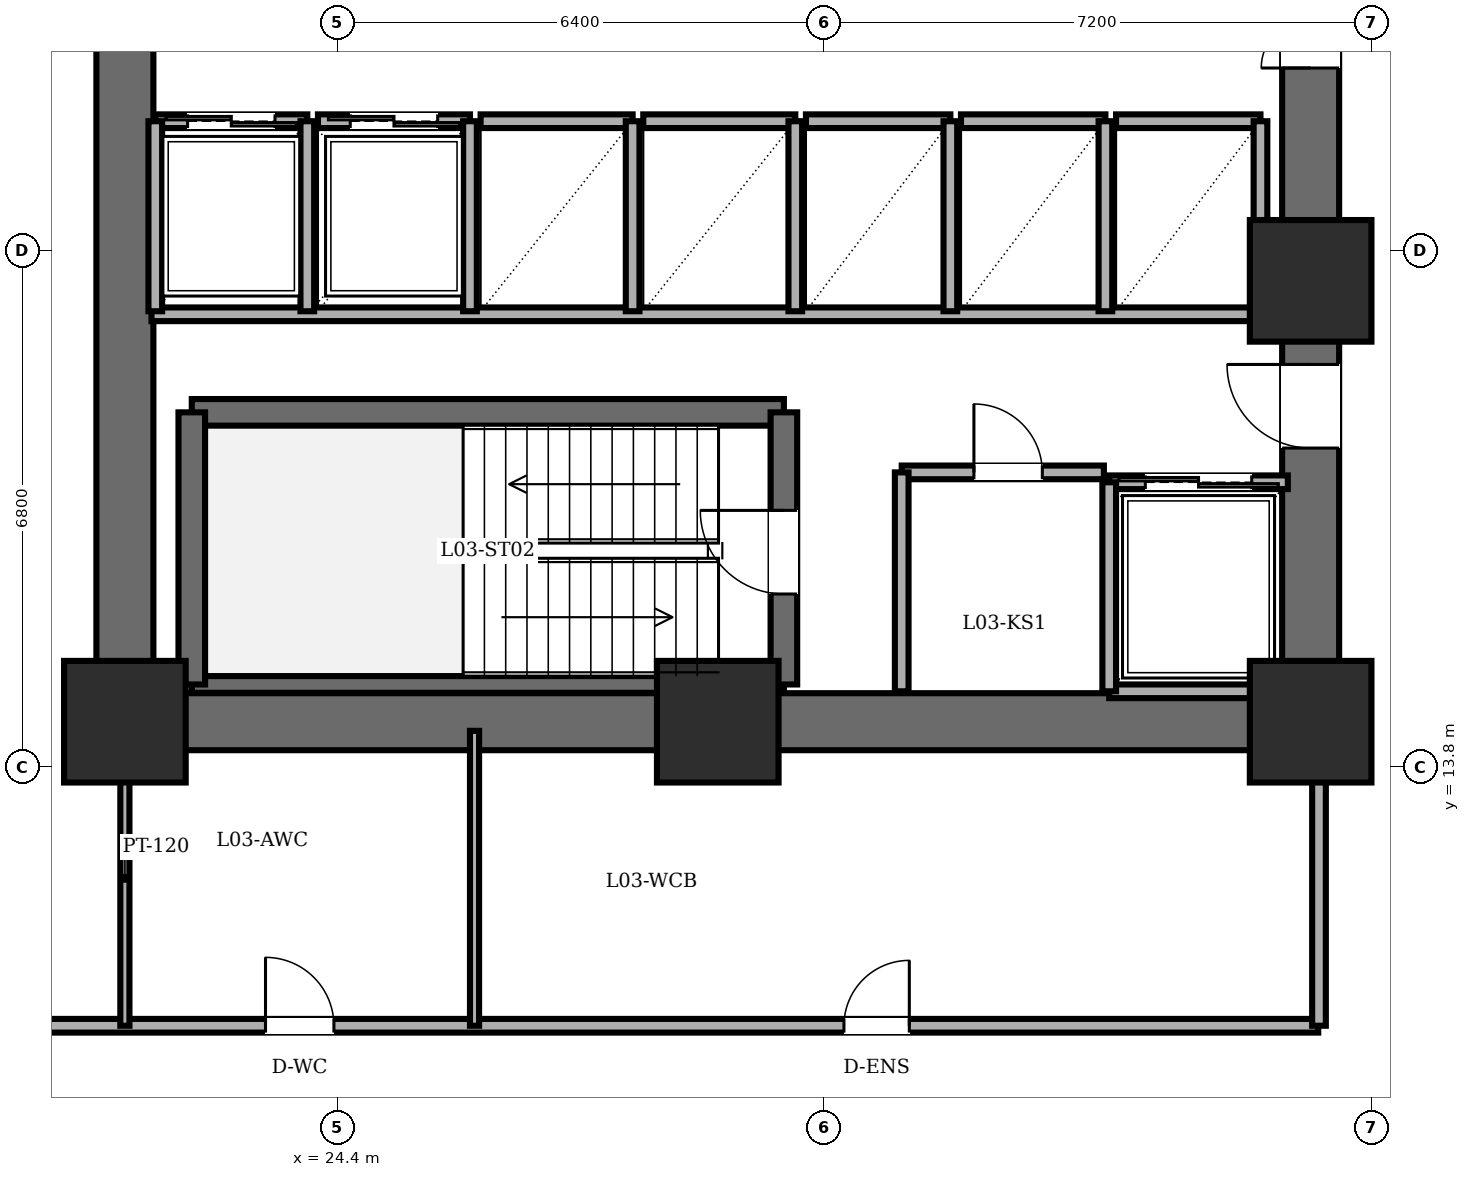
"""IFC4 building model, lengths in metres.
Left out: names, types, materials, properties, quantities, classifications, styles, units other than length and angle.
Written with IfcOpenShell. Run it as: python <this file> out.ifc"""

import sys

from ifc_helpers import new_model, si_unit, direction, frame, frame_2d, origin, origin_2d, place, context, subcontext, project, spatial, rectangle, extrude, element, fill, save


model = new_model("IFC4")
c1 = context("Model", 3, precision=1e-05, world=origin(), true_north=direction((0.0, 1.0)))
c2 = subcontext(c1, "Body", "Model", "MODEL_VIEW")
j1 = project(units=[si_unit("LENGTHUNIT", "METRE"), si_unit("PLANEANGLEUNIT", "RADIAN")], contexts=[c1])
p1 = place(None, origin())
s1 = spatial("IfcSite", under=j1, at=p1, CompositionType="ELEMENT")
p2 = place(p1, origin())
s2 = spatial("IfcBuilding", under=s1, at=p2, CompositionType="ELEMENT")
p3 = place(p2, frame((0.0, 0.0, 10.05)))
s3 = spatial("IfcBuildingStorey", under=s2, at=p3, CompositionType="ELEMENT", Elevation=10.05)
for number, where, z_axis, x_axis in (
    (1, (21.6, 14.4, 0.0), (0.0, 0.0, 1.0), (1.0, 0.0, 0.0)),
    (2, (29.4, 14.4, 0.0), (0.0, 0.0, 1.0), (1.0, 0.0, 0.0)),
    (3, (37.2, 14.4, 0.0), (0.0, 0.0, 1.0), (1.0, 0.0, 0.0)),
    (4, (37.2, 20.2, 0.0), (0.0, 0.0, 1.0), (1.0, 0.0, 0.0)),
):
    element("IfcColumn", number, at=place(p3, frame(where, z_axis=z_axis, x_axis=x_axis)), inside=s3, PredefinedType="COLUMN", context=c2, shape_type="SweptSolid", body=[
        extrude(rectangle(XDim=1.6, YDim=1.6, at=origin_2d()), origin(), (0.0, 0.0, 1.0), 4.65),
    ])
p4 = place(p3, frame((21.6, 14.4, 0.0), z_axis=(0.0, 0.0, 1.0), x_axis=(0.0, 1.0, 0.0)))
e5 = element("IfcWall", 5, at=p4, inside=s3, PredefinedType="SHEAR", context=c2, shape_type="SweptSolid", body=[
    extrude(rectangle(XDim=19.2, YDim=0.75, at=frame_2d((9.6, 0.0))), origin(), (0.0, 0.0, 1.0), 4.43),
])
p5 = place(p3, frame((37.2, 14.4, 0.0), z_axis=(0.0, 0.0, 1.0), x_axis=(-1.0, 0.0, 0.0)))
e6 = element("IfcWall", 6, at=p5, inside=s3, PredefinedType="SHEAR", context=c2, shape_type="SweptSolid", body=[
    extrude(rectangle(XDim=15.6, YDim=0.75, at=frame_2d((7.8, 0.0))), origin(), (0.0, 0.0, 1.0), 4.43),
])
p6 = place(p3, frame((37.2, 14.4, 0.0), z_axis=(0.0, 0.0, 1.0), x_axis=(0.0, 1.0, 0.0)))
e7 = element("IfcWall", 7, at=p6, inside=s3, PredefinedType="SHEAR", context=c2, shape_type="SweptSolid", body=[
    extrude(rectangle(XDim=19.2, YDim=0.75, at=frame_2d((9.6, 0.0))), origin(), (0.0, 0.0, 1.0), 4.43),
])
p7 = place(p6, frame((15.8, 0.0, 0.0)))
e8 = element("IfcOpeningElement", 8, at=p7, cuts=e7, PredefinedType="OPENING", context=c2, shape_type="SweptSolid", body=[
    extrude(rectangle(XDim=1.15, YDim=2.15, at=frame_2d((0.575, 1.075))), frame((0.0, 0.385, 0.0), z_axis=(0.0, -1.0, 0.0), x_axis=(1.0, 0.0, 0.0)), (0.0, 0.0, 1.0), 0.77),
])
p8 = place(p6, frame((3.6, 0.0, 0.0)))
e9 = element("IfcOpeningElement", 9, at=p8, cuts=e7, PredefinedType="OPENING", context=c2, shape_type="SweptSolid", body=[
    extrude(rectangle(XDim=1.1, YDim=2.15, at=frame_2d((0.55, 1.075))), frame((0.0, 0.385, 0.0), z_axis=(0.0, -1.0, 0.0), x_axis=(1.0, 0.0, 0.0)), (0.0, 0.0, 1.0), 0.77),
])
p9 = place(p6, frame((8.6, 0.0, 0.0)))
e10 = element("IfcOpeningElement", 10, at=p9, cuts=e7, PredefinedType="OPENING", context=c2, shape_type="SweptSolid", body=[
    extrude(rectangle(XDim=1.3, YDim=2.2, at=frame_2d((0.65, 1.1))), frame((0.0, 0.385, 0.0), z_axis=(0.0, -1.0, 0.0), x_axis=(1.0, 0.0, 0.0)), (0.0, 0.0, 1.0), 0.77),
])
p10 = place(p3, frame((22.48, 18.47, 0.0), z_axis=(0.0, 0.0, 1.0), x_axis=(1.0, 0.0, 0.0)))
e11 = element("IfcWall", 11, at=p10, inside=s3, PredefinedType="SOLIDWALL", context=c2, shape_type="SweptSolid", body=[
    extrude(rectangle(XDim=7.79, YDim=0.35, at=frame_2d((3.895, 0.0))), origin(), (0.0, 0.0, 1.0), 4.43),
])
p11 = place(p3, frame((22.48, 14.89, 0.0), z_axis=(0.0, 0.0, 1.0), x_axis=(1.0, 0.0, 0.0)))
e12 = element("IfcWall", 12, at=p11, inside=s3, PredefinedType="PARTITIONING", context=c2, shape_type="SweptSolid", body=[
    extrude(rectangle(XDim=7.79, YDim=0.22, at=frame_2d((3.895, 0.0))), origin(), (0.0, 0.0, 1.0), 4.43),
])
p12 = place(p3, frame((22.48, 14.89, 0.0), z_axis=(0.0, 0.0, 1.0), x_axis=(0.0, 1.0, 0.0)))
e13 = element("IfcWall", 13, at=p12, inside=s3, PredefinedType="SOLIDWALL", context=c2, shape_type="SweptSolid", body=[
    extrude(rectangle(XDim=3.58, YDim=0.35, at=frame_2d((1.79, 0.0))), origin(), (0.0, 0.0, 1.0), 4.43),
])
p13 = place(p3, frame((30.27, 14.89, 0.0), z_axis=(0.0, 0.0, 1.0), x_axis=(0.0, 1.0, 0.0)))
e14 = element("IfcWall", 14, at=p13, inside=s3, PredefinedType="SOLIDWALL", context=c2, shape_type="SweptSolid", body=[
    extrude(rectangle(XDim=3.58, YDim=0.35, at=frame_2d((1.79, 0.0))), origin(), (0.0, 0.0, 1.0), 4.43),
])
p14 = place(p13, frame((1.19, 0.0, 0.0)))
e15 = element("IfcOpeningElement", 15, at=p14, cuts=e14, PredefinedType="OPENING", context=c2, shape_type="SweptSolid", body=[
    extrude(rectangle(XDim=1.1, YDim=2.15, at=frame_2d((0.55, 1.075))), frame((0.0, 0.185, 0.0), z_axis=(0.0, -1.0, 0.0), x_axis=(1.0, 0.0, 0.0)), (0.0, 0.0, 1.0), 0.37),
])
p15 = place(p3, frame((21.95, 19.76, 0.0), z_axis=(0.0, 0.0, 1.0), x_axis=(1.0, 0.0, 0.0)))
e16 = element("IfcWall", 16, at=p15, inside=s3, PredefinedType="PARTITIONING", context=c2, shape_type="SweptSolid", body=[
    extrude(rectangle(XDim=14.87, YDim=0.18, at=frame_2d((7.435, 0.0))), origin(), (0.0, 0.0, 1.0), 4.43),
])
p16 = place(p3, frame((31.82, 17.68, 0.0), z_axis=(0.0, 0.0, 1.0), x_axis=(1.0, 0.0, 0.0)))
e17 = element("IfcWall", 17, at=p16, inside=s3, PredefinedType="PARTITIONING", context=c2, shape_type="SweptSolid", body=[
    extrude(rectangle(XDim=2.66, YDim=0.18, at=frame_2d((1.33, 0.0))), origin(), (0.0, 0.0, 1.0), 4.43),
])
p17 = place(p16, frame((0.95, 0.0, 0.0)))
e18 = element("IfcOpeningElement", 18, at=p17, cuts=e17, PredefinedType="OPENING", context=c2, shape_type="SweptSolid", body=[
    extrude(rectangle(XDim=0.9, YDim=2.05, at=frame_2d((0.45, 1.025))), frame((0.0, 0.1, 0.0), z_axis=(0.0, -1.0, 0.0), x_axis=(1.0, 0.0, 0.0)), (0.0, 0.0, 1.0), 0.2),
])
p18 = place(p3, frame((31.82, 14.8, 0.0), z_axis=(0.0, 0.0, 1.0), x_axis=(0.0, 1.0, 0.0)))
e19 = element("IfcWall", 19, at=p18, inside=s3, PredefinedType="PARTITIONING", context=c2, shape_type="SweptSolid", body=[
    extrude(rectangle(XDim=2.88, YDim=0.18, at=frame_2d((1.44, 0.0))), origin(), (0.0, 0.0, 1.0), 4.43),
])
p19 = place(p3, frame((34.55, 17.55, 0.0), z_axis=(0.0, 0.0, 1.0), x_axis=(1.0, 0.0, 0.0)))
e20 = element("IfcWall", 20, at=p19, inside=s3, PredefinedType="PARTITIONING", context=c2, shape_type="SweptSolid", body=[
    extrude(rectangle(XDim=2.35, YDim=0.18, at=frame_2d((1.175, 0.0))), origin(), (0.0, 0.0, 1.0), 4.43),
])
p20 = place(p19, frame((0.475, 0.0, 0.0)))
e21 = element("IfcOpeningElement", 21, at=p20, cuts=e20, PredefinedType="OPENING", context=c2, shape_type="SweptSolid", body=[
    extrude(rectangle(XDim=1.4, YDim=2.3, at=frame_2d((0.7, 1.15))), frame((0.0, 0.1, 0.0), z_axis=(0.0, -1.0, 0.0), x_axis=(1.0, 0.0, 0.0)), (0.0, 0.0, 1.0), 0.2),
])
p21 = place(p3, frame((36.9, 14.8, 0.0), z_axis=(0.0, 0.0, 1.0), x_axis=(-1.0, 0.0, 0.0)))
e22 = element("IfcWall", 22, at=p21, inside=s3, PredefinedType="PARTITIONING", context=c2, shape_type="SweptSolid", body=[
    extrude(rectangle(XDim=2.35, YDim=0.18, at=frame_2d((1.175, 0.0))), origin(), (0.0, 0.0, 1.0), 4.43),
])
p22 = place(p3, frame((34.55, 17.55, 0.0), z_axis=(0.0, 0.0, 1.0), x_axis=(0.0, -1.0, 0.0)))
e23 = element("IfcWall", 23, at=p22, inside=s3, PredefinedType="PARTITIONING", context=c2, shape_type="SweptSolid", body=[
    extrude(rectangle(XDim=2.75, YDim=0.18, at=frame_2d((1.375, 0.0))), origin(), (0.0, 0.0, 1.0), 4.43),
])
p23 = place(p3, frame((22.0, 22.3, 0.0), z_axis=(0.0, 0.0, 1.0), x_axis=(1.0, 0.0, 0.0)))
e24 = element("IfcWall", 24, at=p23, inside=s3, PredefinedType="PARTITIONING", context=c2, shape_type="SweptSolid", body=[
    extrude(rectangle(XDim=2.0, YDim=0.18, at=frame_2d((1.0, 0.0))), origin(), (0.0, 0.0, 1.0), 4.43),
])
p24 = place(p23, frame((0.425, 0.0, 0.0)))
e25 = element("IfcOpeningElement", 25, at=p24, cuts=e24, PredefinedType="OPENING", context=c2, shape_type="SweptSolid", body=[
    extrude(rectangle(XDim=1.15, YDim=2.2, at=frame_2d((0.575, 1.1))), frame((0.0, 0.1, 0.0), z_axis=(0.0, -1.0, 0.0), x_axis=(1.0, 0.0, 0.0)), (0.0, 0.0, 1.0), 0.2),
])
for number, where, z_axis, x_axis in (
    (26, (24.0, 19.8, 0.0), (0.0, 0.0, 1.0), (0.0, 1.0, 0.0)),
    (27, (22.0, 22.3, 0.0), (0.0, 0.0, 1.0), (0.0, -1.0, 0.0)),
):
    element("IfcWall", number, at=place(p3, frame(where, z_axis=z_axis, x_axis=x_axis)), inside=s3, PredefinedType="PARTITIONING", context=c2, shape_type="SweptSolid", body=[
        extrude(rectangle(XDim=2.5, YDim=0.18, at=frame_2d((1.25, 0.0))), origin(), (0.0, 0.0, 1.0), 4.43),
    ])
p25 = place(p3, frame((24.14, 22.3, 0.0), z_axis=(0.0, 0.0, 1.0), x_axis=(1.0, 0.0, 0.0)))
e28 = element("IfcWall", 28, at=p25, inside=s3, PredefinedType="PARTITIONING", context=c2, shape_type="SweptSolid", body=[
    extrude(rectangle(XDim=2.0, YDim=0.18, at=frame_2d((1.0, 0.0))), origin(), (0.0, 0.0, 1.0), 4.43),
])
p26 = place(p25, frame((0.425, 0.0, 0.0)))
e29 = element("IfcOpeningElement", 29, at=p26, cuts=e28, PredefinedType="OPENING", context=c2, shape_type="SweptSolid", body=[
    extrude(rectangle(XDim=1.15, YDim=2.2, at=frame_2d((0.575, 1.1))), frame((0.0, 0.1, 0.0), z_axis=(0.0, -1.0, 0.0), x_axis=(1.0, 0.0, 0.0)), (0.0, 0.0, 1.0), 0.2),
])
p27 = place(p3, frame((26.14, 19.8, 0.0), z_axis=(0.0, 0.0, 1.0), x_axis=(0.0, 1.0, 0.0)))
e30 = element("IfcWall", 30, at=p27, inside=s3, PredefinedType="PARTITIONING", context=c2, shape_type="SweptSolid", body=[
    extrude(rectangle(XDim=2.5, YDim=0.18, at=frame_2d((1.25, 0.0))), origin(), (0.0, 0.0, 1.0), 4.43),
])
p28 = place(p3, frame((26.28, 22.3, 0.0), z_axis=(0.0, 0.0, 1.0), x_axis=(1.0, 0.0, 0.0)))
e31 = element("IfcWall", 31, at=p28, inside=s3, PredefinedType="PARTITIONING", context=c2, shape_type="SweptSolid", body=[
    extrude(rectangle(XDim=2.0, YDim=0.18, at=frame_2d((1.0, 0.0))), origin(), (0.0, 0.0, 1.0), 4.43),
])
p29 = place(p3, frame((28.28, 19.8, 0.0), z_axis=(0.0, 0.0, 1.0), x_axis=(0.0, 1.0, 0.0)))
e32 = element("IfcWall", 32, at=p29, inside=s3, PredefinedType="PARTITIONING", context=c2, shape_type="SweptSolid", body=[
    extrude(rectangle(XDim=2.5, YDim=0.18, at=frame_2d((1.25, 0.0))), origin(), (0.0, 0.0, 1.0), 4.43),
])
p30 = place(p3, frame((28.42, 22.3, 0.0), z_axis=(0.0, 0.0, 1.0), x_axis=(1.0, 0.0, 0.0)))
e33 = element("IfcWall", 33, at=p30, inside=s3, PredefinedType="PARTITIONING", context=c2, shape_type="SweptSolid", body=[
    extrude(rectangle(XDim=2.0, YDim=0.18, at=frame_2d((1.0, 0.0))), origin(), (0.0, 0.0, 1.0), 4.43),
])
p31 = place(p3, frame((30.42, 19.8, 0.0), z_axis=(0.0, 0.0, 1.0), x_axis=(0.0, 1.0, 0.0)))
e34 = element("IfcWall", 34, at=p31, inside=s3, PredefinedType="PARTITIONING", context=c2, shape_type="SweptSolid", body=[
    extrude(rectangle(XDim=2.5, YDim=0.18, at=frame_2d((1.25, 0.0))), origin(), (0.0, 0.0, 1.0), 4.43),
])
p32 = place(p3, frame((30.56, 22.3, 0.0), z_axis=(0.0, 0.0, 1.0), x_axis=(1.0, 0.0, 0.0)))
e35 = element("IfcWall", 35, at=p32, inside=s3, PredefinedType="PARTITIONING", context=c2, shape_type="SweptSolid", body=[
    extrude(rectangle(XDim=1.9, YDim=0.18, at=frame_2d((0.95, 0.0))), origin(), (0.0, 0.0, 1.0), 4.43),
])
p33 = place(p3, frame((32.46, 19.8, 0.0), z_axis=(0.0, 0.0, 1.0), x_axis=(0.0, 1.0, 0.0)))
e36 = element("IfcWall", 36, at=p33, inside=s3, PredefinedType="PARTITIONING", context=c2, shape_type="SweptSolid", body=[
    extrude(rectangle(XDim=2.5, YDim=0.18, at=frame_2d((1.25, 0.0))), origin(), (0.0, 0.0, 1.0), 4.43),
])
p34 = place(p3, frame((32.6, 22.3, 0.0), z_axis=(0.0, 0.0, 1.0), x_axis=(1.0, 0.0, 0.0)))
e37 = element("IfcWall", 37, at=p34, inside=s3, PredefinedType="PARTITIONING", context=c2, shape_type="SweptSolid", body=[
    extrude(rectangle(XDim=1.9, YDim=0.18, at=frame_2d((0.95, 0.0))), origin(), (0.0, 0.0, 1.0), 4.43),
])
p35 = place(p3, frame((34.5, 19.8, 0.0), z_axis=(0.0, 0.0, 1.0), x_axis=(0.0, 1.0, 0.0)))
e38 = element("IfcWall", 38, at=p35, inside=s3, PredefinedType="PARTITIONING", context=c2, shape_type="SweptSolid", body=[
    extrude(rectangle(XDim=2.5, YDim=0.18, at=frame_2d((1.25, 0.0))), origin(), (0.0, 0.0, 1.0), 4.43),
])
p36 = place(p3, frame((34.64, 22.3, 0.0), z_axis=(0.0, 0.0, 1.0), x_axis=(1.0, 0.0, 0.0)))
e39 = element("IfcWall", 39, at=p36, inside=s3, PredefinedType="PARTITIONING", context=c2, shape_type="SweptSolid", body=[
    extrude(rectangle(XDim=1.9, YDim=0.18, at=frame_2d((0.95, 0.0))), origin(), (0.0, 0.0, 1.0), 4.43),
])
p37 = place(p3, frame((36.54, 19.8, 0.0), z_axis=(0.0, 0.0, 1.0), x_axis=(0.0, 1.0, 0.0)))
e40 = element("IfcWall", 40, at=p37, inside=s3, PredefinedType="PARTITIONING", context=c2, shape_type="SweptSolid", body=[
    extrude(rectangle(XDim=2.5, YDim=0.18, at=frame_2d((1.25, 0.0))), origin(), (0.0, 0.0, 1.0), 4.43),
])
p38 = place(p3, frame((17.85, 10.4, 0.0), z_axis=(0.0, 0.0, 1.0), x_axis=(1.0, 0.0, 0.0)))
e41 = element("IfcWall", 41, at=p38, inside=s3, PredefinedType="PARTITIONING", context=c2, shape_type="SweptSolid", body=[
    extrude(rectangle(XDim=19.45, YDim=0.18, at=frame_2d((9.725, 0.0))), origin(), (0.0, 0.0, 1.0), 4.43),
])
p39 = place(p38, frame((1.575, 0.0, 0.0)))
e42 = element("IfcOpeningElement", 42, at=p39, cuts=e41, PredefinedType="OPENING", context=c2, shape_type="SweptSolid", body=[
    extrude(rectangle(XDim=0.92, YDim=2.1, at=frame_2d((0.46, 1.05))), frame((0.0, 0.1, 0.0), z_axis=(0.0, -1.0, 0.0), x_axis=(1.0, 0.0, 0.0)), (0.0, 0.0, 1.0), 0.2),
])
p40 = place(p38, frame((5.6, 0.0, 0.0)))
e43 = element("IfcOpeningElement", 43, at=p40, cuts=e41, PredefinedType="OPENING", context=c2, shape_type="SweptSolid", body=[
    extrude(rectangle(XDim=0.9, YDim=2.1, at=frame_2d((0.45, 1.05))), frame((0.0, 0.1, 0.0), z_axis=(0.0, -1.0, 0.0), x_axis=(1.0, 0.0, 0.0)), (0.0, 0.0, 1.0), 0.2),
])
p41 = place(p38, frame((13.21, 0.0, 0.0)))
e44 = element("IfcOpeningElement", 44, at=p41, cuts=e41, PredefinedType="OPENING", context=c2, shape_type="SweptSolid", body=[
    extrude(rectangle(XDim=0.86, YDim=2.1, at=frame_2d((0.43, 1.05))), frame((0.0, 0.1, 0.0), z_axis=(0.0, -1.0, 0.0), x_axis=(1.0, 0.0, 0.0)), (0.0, 0.0, 1.0), 0.2),
])
p42 = place(p3, frame((21.6, 10.4, 0.0), z_axis=(0.0, 0.0, 1.0), x_axis=(0.0, 1.0, 0.0)))
e45 = element("IfcWall", 45, at=p42, inside=s3, PredefinedType="PARTITIONING", context=c2, shape_type="SweptSolid", body=[
    extrude(rectangle(XDim=3.88, YDim=0.12, at=frame_2d((1.94, 0.0))), origin(), (0.0, 0.0, 1.0), 3.612),
])
p43 = place(p3, frame((26.2, 10.4, 0.0), z_axis=(0.0, 0.0, 1.0), x_axis=(0.0, 1.0, 0.0)))
e46 = element("IfcWall", 46, at=p43, inside=s3, PredefinedType="PARTITIONING", context=c2, shape_type="SweptSolid", body=[
    extrude(rectangle(XDim=3.88, YDim=0.12, at=frame_2d((1.94, 0.0))), origin(), (0.0, 0.0, 1.0), 4.43),
])
p44 = place(p3, frame((37.31, 10.4, 0.0), z_axis=(0.0, 0.0, 1.0), x_axis=(0.0, 1.0, 0.0)))
e47 = element("IfcWall", 47, at=p44, inside=s3, PredefinedType="PARTITIONING", context=c2, shape_type="SweptSolid", body=[
    extrude(rectangle(XDim=3.88, YDim=0.18, at=frame_2d((1.94, 0.0))), origin(), (0.0, 0.0, 1.0), 3.612),
])
p45 = place(p14, origin())
e48 = element("IfcDoor", 48, at=p45, inside=s3, OperationType="SINGLE_SWING_RIGHT", PredefinedType="DOOR", context=c2, shape_type="SweptSolid", body=[
    extrude(rectangle(XDim=1.1, YDim=2.15, at=frame_2d((0.55, 1.075))), frame((0.0, 0.025, 0.0), z_axis=(0.0, -1.0, 0.0), x_axis=(1.0, 0.0, 0.0)), (0.0, 0.0, 1.0), 0.05),
])
fill(e15, e48)
p46 = place(p8, origin())
e49 = element("IfcDoor", 49, at=p46, inside=s3, OperationType="SINGLE_SWING_RIGHT", PredefinedType="DOOR", context=c2, shape_type="SweptSolid", body=[
    extrude(rectangle(XDim=1.1, YDim=2.15, at=frame_2d((0.55, 1.075))), frame((0.0, 0.025, 0.0), z_axis=(0.0, -1.0, 0.0), x_axis=(1.0, 0.0, 0.0)), (0.0, 0.0, 1.0), 0.05),
])
fill(e9, e49)
p47 = place(p17, origin())
e50 = element("IfcDoor", 50, at=p47, inside=s3, OperationType="SINGLE_SWING_LEFT", PredefinedType="DOOR", context=c2, shape_type="SweptSolid", body=[
    extrude(rectangle(XDim=0.9, YDim=2.05, at=frame_2d((0.45, 1.025))), frame((0.0, 0.025, 0.0), z_axis=(0.0, -1.0, 0.0), x_axis=(1.0, 0.0, 0.0)), (0.0, 0.0, 1.0), 0.05),
])
fill(e18, e50)
p48 = place(p20, origin())
e51 = element("IfcDoor", 51, at=p48, inside=s3, OperationType="DOUBLE_DOOR_SLIDING", PredefinedType="DOOR", context=c2, shape_type="SweptSolid", body=[
    extrude(rectangle(XDim=1.4, YDim=2.3, at=frame_2d((0.7, 1.15))), frame((0.0, 0.025, 0.0), z_axis=(0.0, -1.0, 0.0), x_axis=(1.0, 0.0, 0.0)), (0.0, 0.0, 1.0), 0.05),
])
fill(e21, e51)
p49 = place(p24, origin())
e52 = element("IfcDoor", 52, at=p49, inside=s3, OperationType="DOUBLE_DOOR_SLIDING", PredefinedType="DOOR", context=c2, shape_type="SweptSolid", body=[
    extrude(rectangle(XDim=1.15, YDim=2.2, at=frame_2d((0.575, 1.1))), frame((0.0, 0.025, 0.0), z_axis=(0.0, -1.0, 0.0), x_axis=(1.0, 0.0, 0.0)), (0.0, 0.0, 1.0), 0.05),
])
fill(e25, e52)
p50 = place(p26, origin())
e53 = element("IfcDoor", 53, at=p50, inside=s3, OperationType="DOUBLE_DOOR_SLIDING", PredefinedType="DOOR", context=c2, shape_type="SweptSolid", body=[
    extrude(rectangle(XDim=1.15, YDim=2.2, at=frame_2d((0.575, 1.1))), frame((0.0, 0.025, 0.0), z_axis=(0.0, -1.0, 0.0), x_axis=(1.0, 0.0, 0.0)), (0.0, 0.0, 1.0), 0.05),
])
fill(e29, e53)
p51 = place(p9, origin())
e54 = element("IfcDoor", 54, at=p51, inside=s3, OperationType="DOUBLE_DOOR_SINGLE_SWING", PredefinedType="DOOR", context=c2, shape_type="SweptSolid", body=[
    extrude(rectangle(XDim=1.3, YDim=2.2, at=frame_2d((0.65, 1.1))), frame((0.0, 0.025, 0.0), z_axis=(0.0, -1.0, 0.0), x_axis=(1.0, 0.0, 0.0)), (0.0, 0.0, 1.0), 0.05),
])
fill(e10, e54)
p52 = place(p40, origin())
e55 = element("IfcDoor", 55, at=p52, inside=s3, OperationType="SINGLE_SWING_LEFT", PredefinedType="DOOR", context=c2, shape_type="SweptSolid", body=[
    extrude(rectangle(XDim=0.9, YDim=2.1, at=frame_2d((0.45, 1.05))), frame((0.0, 0.025, 0.0), z_axis=(0.0, -1.0, 0.0), x_axis=(1.0, 0.0, 0.0)), (0.0, 0.0, 1.0), 0.05),
])
fill(e43, e55)
p53 = place(p41, origin())
e56 = element("IfcDoor", 56, at=p53, inside=s3, OperationType="SINGLE_SWING_RIGHT", PredefinedType="DOOR", context=c2, shape_type="SweptSolid", body=[
    extrude(rectangle(XDim=0.86, YDim=2.1, at=frame_2d((0.43, 1.05))), frame((0.0, 0.025, 0.0), z_axis=(0.0, -1.0, 0.0), x_axis=(1.0, 0.0, 0.0)), (0.0, 0.0, 1.0), 0.05),
])
fill(e44, e56)
save(model, sys.argv[1])
